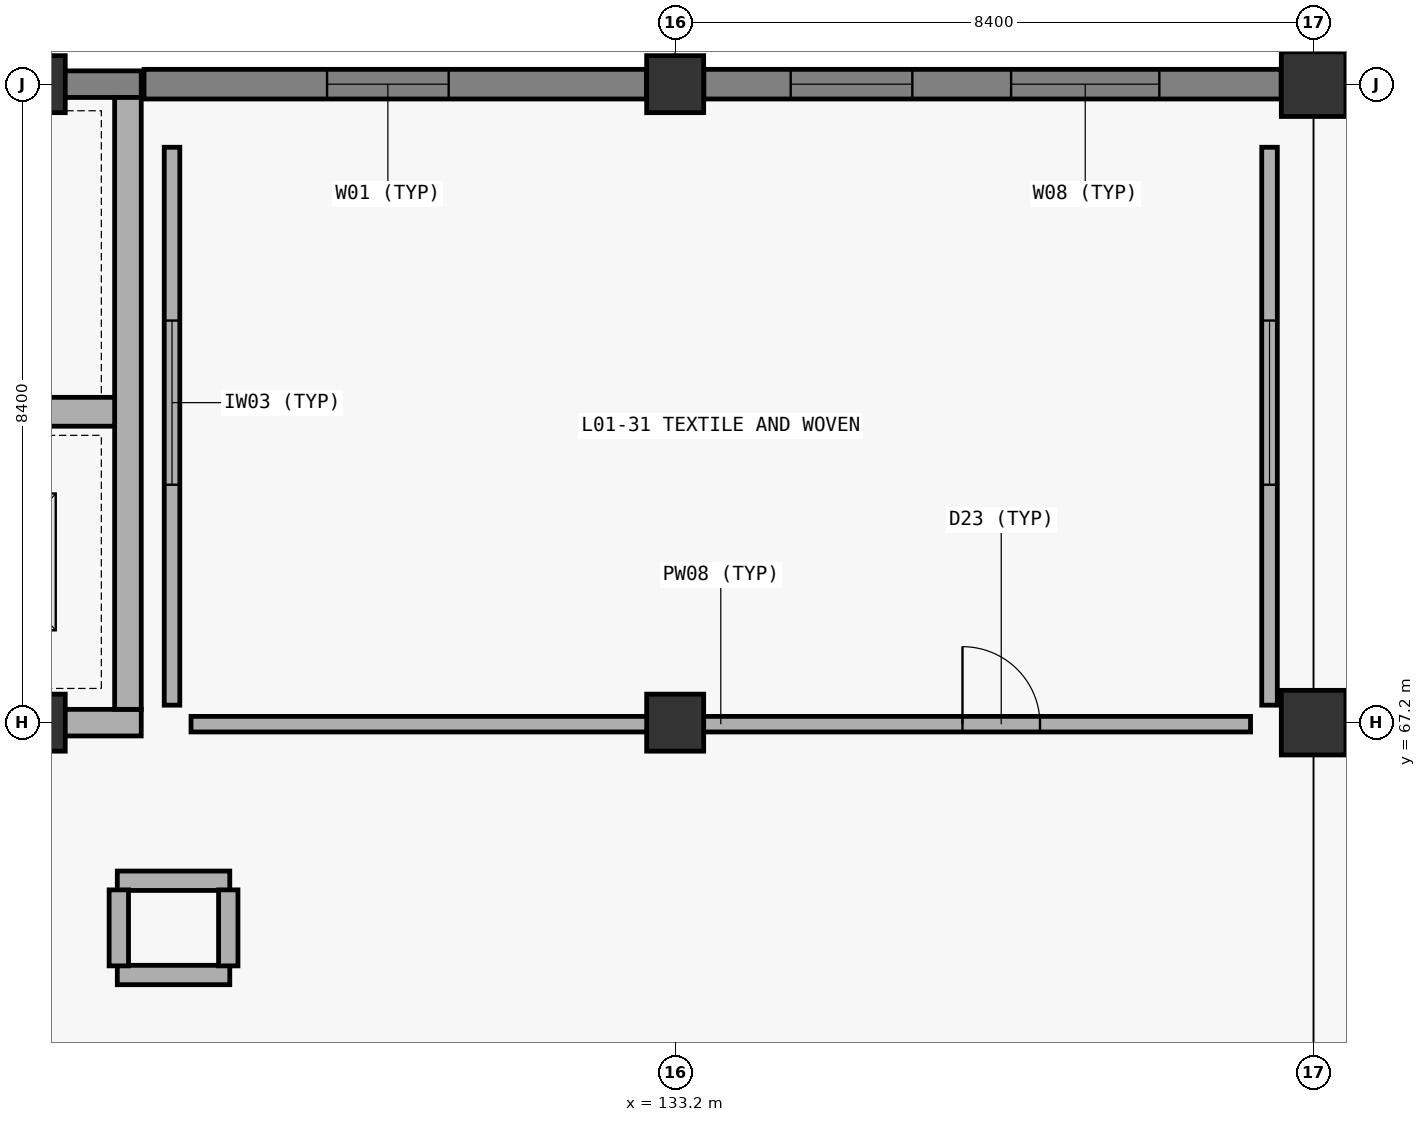
"""IFC4 building model, lengths in metres.
Left out: names, types, materials, properties, quantities, classifications, styles, units other than length and angle.
Written with IfcOpenShell. Run it as: python <this file> out.ifc"""

import sys

from ifc_helpers import new_model, si_unit, direction, frame, frame_2d, origin, origin_2d, place, context, subcontext, project, spatial, rectangle, extrude, element, fill, save


model = new_model("IFC4")
c1 = context("Model", 3, precision=1e-05, world=origin(), true_north=direction((0.0, 1.0)))
c2 = subcontext(c1, "Body", "Model", "MODEL_VIEW")
j1 = project(units=[si_unit("LENGTHUNIT", "METRE"), si_unit("PLANEANGLEUNIT", "RADIAN")], contexts=[c1])
p1 = place(None, origin())
s1 = spatial("IfcSite", under=j1, at=p1, CompositionType="ELEMENT")
p2 = place(p1, origin())
s2 = spatial("IfcBuilding", under=s1, at=p2, CompositionType="ELEMENT")
p3 = place(p2, frame((0.0, 0.0, 5.4)))
s3 = spatial("IfcBuildingStorey", under=s2, at=p3, CompositionType="ELEMENT", Elevation=5.4)
for number, where, z_axis, x_axis in (
    (1, (124.8, 67.2, 0.0), (0.0, 0.0, 1.0), (1.0, 0.0, 0.0)),
    (2, (124.8, 75.6, 0.0), (0.0, 0.0, 1.0), (1.0, 0.0, 0.0)),
    (3, (133.2, 67.2, 0.0), (0.0, 0.0, 1.0), (1.0, 0.0, 0.0)),
    (4, (133.2, 75.6, 0.0), (0.0, 0.0, 1.0), (1.0, 0.0, 0.0)),
):
    element("IfcColumn", number, at=place(p3, frame(where, z_axis=z_axis, x_axis=x_axis)), inside=s3, PredefinedType="COLUMN", context=c2, shape_type="SweptSolid", body=[
        extrude(rectangle(XDim=0.75, YDim=0.75, at=origin_2d()), origin(), (0.0, 0.0, 1.0), 5.1),
    ])
for number, where, z_axis, x_axis in (
    (5, (141.6, 67.2, 0.0), (0.0, 0.0, 1.0), (1.0, 0.0, 0.0)),
    (6, (141.6, 75.6, 0.0), (0.0, 0.0, 1.0), (1.0, 0.0, 0.0)),
):
    element("IfcColumn", number, at=place(p3, frame(where, z_axis=z_axis, x_axis=x_axis)), inside=s3, PredefinedType="COLUMN", context=c2, shape_type="SweptSolid", body=[
        extrude(rectangle(XDim=0.85, YDim=0.85, at=origin_2d()), origin(), (0.0, 0.0, 1.0), 5.1),
    ])
p4 = place(p3, frame((116.825, 67.2, 0.0), z_axis=(0.0, 0.0, 1.0), x_axis=(1.0, 0.0, 0.0)))
e7 = element("IfcWall", 7, at=p4, inside=s3, PredefinedType="SHEAR", context=c2, shape_type="SweptSolid", body=[
    extrude(rectangle(XDim=9.35, YDim=0.35, at=frame_2d((4.675, 0.0))), origin(), (0.0, 0.0, 1.0), 5.1),
])
p5 = place(p4, frame((1.75, 0.0, 0.0)))
e8 = element("IfcOpeningElement", 8, at=p5, cuts=e7, PredefinedType="OPENING", context=c2, shape_type="SweptSolid", body=[
    extrude(rectangle(XDim=1.18, YDim=2.24, at=frame_2d((0.59, 1.12))), frame((0.0, 0.185, 0.0), z_axis=(0.0, -1.0, 0.0), x_axis=(1.0, 0.0, 0.0)), (0.0, 0.0, 1.0), 0.37),
])
p6 = place(p3, frame((116.825, 75.6, 0.0), z_axis=(0.0, 0.0, 1.0), x_axis=(1.0, 0.0, 0.0)))
e9 = element("IfcWall", 9, at=p6, inside=s3, PredefinedType="SHEAR", context=c2, shape_type="SweptSolid", body=[
    extrude(rectangle(XDim=9.35, YDim=0.35, at=frame_2d((4.675, 0.0))), origin(), (0.0, 0.0, 1.0), 5.1),
])
p7 = place(p3, frame((126.0, 67.375, 0.0), z_axis=(0.0, 0.0, 1.0), x_axis=(0.0, 1.0, 0.0)))
e10 = element("IfcWall", 10, at=p7, inside=s3, PredefinedType="SHEAR", context=c2, shape_type="SweptSolid", body=[
    extrude(rectangle(XDim=8.05, YDim=0.35, at=frame_2d((4.025, 0.0))), origin(), (0.0, 0.0, 1.0), 5.1),
])
p8 = place(p3, frame((117.175, 71.29, 0.0), z_axis=(0.0, 0.0, 1.0), x_axis=(1.0, 0.0, 0.0)))
e11 = element("IfcWall", 11, at=p8, inside=s3, PredefinedType="SHEAR", context=c2, shape_type="SweptSolid", body=[
    extrude(rectangle(XDim=8.65, YDim=0.38, at=frame_2d((4.325, 0.0))), origin(), (0.0, 0.0, 1.0), 5.1),
])
p9 = place(p8, frame((0.45, 0.0, 0.0)))
e12 = element("IfcOpeningElement", 12, at=p9, cuts=e11, PredefinedType="OPENING", context=c2, shape_type="SweptSolid", body=[
    extrude(rectangle(XDim=1.08, YDim=2.18, at=frame_2d((0.54, 1.09))), frame((0.0, 0.2, 0.0), z_axis=(0.0, -1.0, 0.0), x_axis=(1.0, 0.0, 0.0)), (0.0, 0.0, 1.0), 0.4),
])
p10 = place(p3, frame((126.212, 75.6, 0.0), z_axis=(0.0, 0.0, 1.0), x_axis=(1.0, 0.0, 0.0)))
e13 = element("IfcWall", 13, at=p10, inside=s3, PredefinedType="SOLIDWALL", context=c2, shape_type="SweptSolid", body=[
    extrude(rectangle(XDim=6.611, YDim=0.39, at=frame_2d((3.306, 0.0))), origin(), (0.0, 0.0, 1.0), 4.07),
])
p11 = place(p10, frame((2.408, 0.0, 0.85)))
e14 = element("IfcOpeningElement", 14, at=p11, cuts=e13, PredefinedType="OPENING", context=c2, shape_type="SweptSolid", body=[
    extrude(rectangle(XDim=1.6, YDim=2.5, at=frame_2d((0.8, 1.25))), frame((0.0, 0.205, 0.0), z_axis=(0.0, -1.0, 0.0), x_axis=(1.0, 0.0, 0.0)), (0.0, 0.0, 1.0), 0.41),
])
p12 = place(p3, frame((133.577, 75.6, 0.0), z_axis=(0.0, 0.0, 1.0), x_axis=(1.0, 0.0, 0.0)))
e15 = element("IfcWall", 15, at=p12, inside=s3, PredefinedType="SOLIDWALL", context=c2, shape_type="SweptSolid", body=[
    extrude(rectangle(XDim=7.596, YDim=0.39, at=frame_2d((3.798, 0.0))), origin(), (0.0, 0.0, 1.0), 4.32),
])
p13 = place(p12, frame((1.143, 0.0, 0.85)))
e16 = element("IfcOpeningElement", 16, at=p13, cuts=e15, PredefinedType="OPENING", context=c2, shape_type="SweptSolid", body=[
    extrude(rectangle(XDim=1.6, YDim=2.5, at=frame_2d((0.8, 1.25))), frame((0.0, 0.205, 0.0), z_axis=(0.0, -1.0, 0.0), x_axis=(1.0, 0.0, 0.0)), (0.0, 0.0, 1.0), 0.41),
])
p14 = place(p12, frame((4.043, 0.0, 0.85)))
e17 = element("IfcOpeningElement", 17, at=p14, cuts=e15, PredefinedType="OPENING", context=c2, shape_type="SweptSolid", body=[
    extrude(rectangle(XDim=1.95, YDim=2.3, at=frame_2d((0.975, 1.15))), frame((0.0, 0.205, 0.0), z_axis=(0.0, -1.0, 0.0), x_axis=(1.0, 0.0, 0.0)), (0.0, 0.0, 1.0), 0.41),
])
for number, where, z_axis, x_axis in (
    (18, (125.86, 65.12, 0.0), (0.0, 0.0, 1.0), (1.0, 0.0, 0.0)),
    (19, (125.86, 63.88, 0.0), (0.0, 0.0, 1.0), (1.0, 0.0, 0.0)),
):
    element("IfcWall", number, at=place(p3, frame(where, z_axis=z_axis, x_axis=x_axis)), inside=s3, PredefinedType="PARTITIONING", context=c2, shape_type="SweptSolid", body=[
        extrude(rectangle(XDim=1.48, YDim=0.255, at=frame_2d((0.74, 0.0))), origin(), (0.0, 0.0, 1.0), 4.4),
    ])
p15 = place(p3, frame((125.88, 64.0, 0.0), z_axis=(0.0, 0.0, 1.0), x_axis=(0.0, 1.0, 0.0)))
e20 = element("IfcWall", 20, at=p15, inside=s3, PredefinedType="PARTITIONING", context=c2, shape_type="SweptSolid", body=[
    extrude(rectangle(XDim=1.0, YDim=0.255, at=frame_2d((0.5, 0.0))), origin(), (0.0, 0.0, 1.0), 4.72),
])
p16 = place(p3, frame((127.32, 64.0, 0.0), z_axis=(0.0, 0.0, 1.0), x_axis=(0.0, 1.0, 0.0)))
e21 = element("IfcWall", 21, at=p16, inside=s3, PredefinedType="PARTITIONING", context=c2, shape_type="SweptSolid", body=[
    extrude(rectangle(XDim=1.0, YDim=0.255, at=frame_2d((0.5, 0.0))), origin(), (0.0, 0.0, 1.0), 4.4),
])
p17 = place(p3, frame((126.83, 67.18, 0.0), z_axis=(0.0, 0.0, 1.0), x_axis=(1.0, 0.0, 0.0)))
e22 = element("IfcWall", 22, at=p17, inside=s3, PredefinedType="PARTITIONING", context=c2, shape_type="SweptSolid", body=[
    extrude(rectangle(XDim=13.94, YDim=0.205, at=frame_2d((6.97, 0.0))), origin(), (0.0, 0.0, 1.0), 3.77),
])
p18 = place(p17, frame((10.15, 0.0, 0.0)))
e23 = element("IfcOpeningElement", 23, at=p18, cuts=e22, PredefinedType="OPENING", context=c2, shape_type="SweptSolid", body=[
    extrude(rectangle(XDim=1.02, YDim=2.26, at=frame_2d((0.51, 1.13))), frame((0.0, 0.113, 0.0), z_axis=(0.0, -1.0, 0.0), x_axis=(1.0, 0.0, 0.0)), (0.0, 0.0, 1.0), 0.225),
])
p19 = place(p3, frame((126.58, 67.43, 0.0), z_axis=(0.0, 0.0, 1.0), x_axis=(0.0, 1.0, 0.0)))
e24 = element("IfcWall", 24, at=p19, inside=s3, PredefinedType="PARTITIONING", context=c2, shape_type="SweptSolid", body=[
    extrude(rectangle(XDim=7.34, YDim=0.205, at=frame_2d((3.67, 0.0))), origin(), (0.0, 0.0, 1.0), 4.17),
])
p20 = place(p19, frame((2.9, 0.0, 0.9)))
e25 = element("IfcOpeningElement", 25, at=p20, cuts=e24, PredefinedType="OPENING", context=c2, shape_type="SweptSolid", body=[
    extrude(rectangle(XDim=2.16, YDim=1.42, at=frame_2d((1.08, 0.71))), frame((0.0, 0.113, 0.0), z_axis=(0.0, -1.0, 0.0), x_axis=(1.0, 0.0, 0.0)), (0.0, 0.0, 1.0), 0.225),
])
p21 = place(p3, frame((141.02, 67.43, 0.0), z_axis=(0.0, 0.0, 1.0), x_axis=(0.0, 1.0, 0.0)))
e26 = element("IfcWall", 26, at=p21, inside=s3, PredefinedType="PARTITIONING", context=c2, shape_type="SweptSolid", body=[
    extrude(rectangle(XDim=7.34, YDim=0.205, at=frame_2d((3.67, 0.0))), origin(), (0.0, 0.0, 1.0), 3.77),
])
p22 = place(p21, frame((2.9, 0.0, 0.9)))
e27 = element("IfcOpeningElement", 27, at=p22, cuts=e26, PredefinedType="OPENING", context=c2, shape_type="SweptSolid", body=[
    extrude(rectangle(XDim=2.16, YDim=1.42, at=frame_2d((1.08, 0.71))), frame((0.0, 0.113, 0.0), z_axis=(0.0, -1.0, 0.0), x_axis=(1.0, 0.0, 0.0)), (0.0, 0.0, 1.0), 0.225),
])
p23 = place(p11, origin())
e28 = element("IfcWindow", 28, at=p23, inside=s3, PartitioningType="SINGLE_PANEL", PredefinedType="WINDOW", context=c2, shape_type="SweptSolid", body=[
    extrude(rectangle(XDim=1.6, YDim=2.5, at=frame_2d((0.8, 1.25))), frame((0.0, 0.03, 0.0), z_axis=(0.0, -1.0, 0.0), x_axis=(1.0, 0.0, 0.0)), (0.0, 0.0, 1.0), 0.06),
])
fill(e14, e28)
p24 = place(p13, origin())
e29 = element("IfcWindow", 29, at=p24, inside=s3, PartitioningType="SINGLE_PANEL", PredefinedType="WINDOW", context=c2, shape_type="SweptSolid", body=[
    extrude(rectangle(XDim=1.6, YDim=2.5, at=frame_2d((0.8, 1.25))), frame((0.0, 0.03, 0.0), z_axis=(0.0, -1.0, 0.0), x_axis=(1.0, 0.0, 0.0)), (0.0, 0.0, 1.0), 0.06),
])
fill(e16, e29)
p25 = place(p14, origin())
e30 = element("IfcWindow", 30, at=p25, inside=s3, PartitioningType="SINGLE_PANEL", PredefinedType="WINDOW", context=c2, shape_type="SweptSolid", body=[
    extrude(rectangle(XDim=1.95, YDim=2.3, at=frame_2d((0.975, 1.15))), frame((0.0, 0.03, 0.0), z_axis=(0.0, -1.0, 0.0), x_axis=(1.0, 0.0, 0.0)), (0.0, 0.0, 1.0), 0.06),
])
fill(e17, e30)
p26 = place(p18, origin())
e31 = element("IfcDoor", 31, at=p26, inside=s3, OperationType="SINGLE_SWING_LEFT", PredefinedType="DOOR", context=c2, shape_type="SweptSolid", body=[
    extrude(rectangle(XDim=1.02, YDim=2.26, at=frame_2d((0.51, 1.13))), frame((0.0, 0.025, 0.0), z_axis=(0.0, -1.0, 0.0), x_axis=(1.0, 0.0, 0.0)), (0.0, 0.0, 1.0), 0.05),
])
fill(e23, e31)
p27 = place(p20, origin())
e32 = element("IfcWindow", 32, at=p27, inside=s3, PartitioningType="SINGLE_PANEL", PredefinedType="WINDOW", context=c2, shape_type="SweptSolid", body=[
    extrude(rectangle(XDim=2.16, YDim=1.42, at=frame_2d((1.08, 0.71))), frame((0.0, 0.03, 0.0), z_axis=(0.0, -1.0, 0.0), x_axis=(1.0, 0.0, 0.0)), (0.0, 0.0, 1.0), 0.06),
])
fill(e25, e32)
p28 = place(p22, origin())
e33 = element("IfcWindow", 33, at=p28, inside=s3, PartitioningType="SINGLE_PANEL", PredefinedType="WINDOW", context=c2, shape_type="SweptSolid", body=[
    extrude(rectangle(XDim=2.16, YDim=1.42, at=frame_2d((1.08, 0.71))), frame((0.0, 0.03, 0.0), z_axis=(0.0, -1.0, 0.0), x_axis=(1.0, 0.0, 0.0)), (0.0, 0.0, 1.0), 0.06),
])
fill(e27, e33)
save(model, sys.argv[1])
